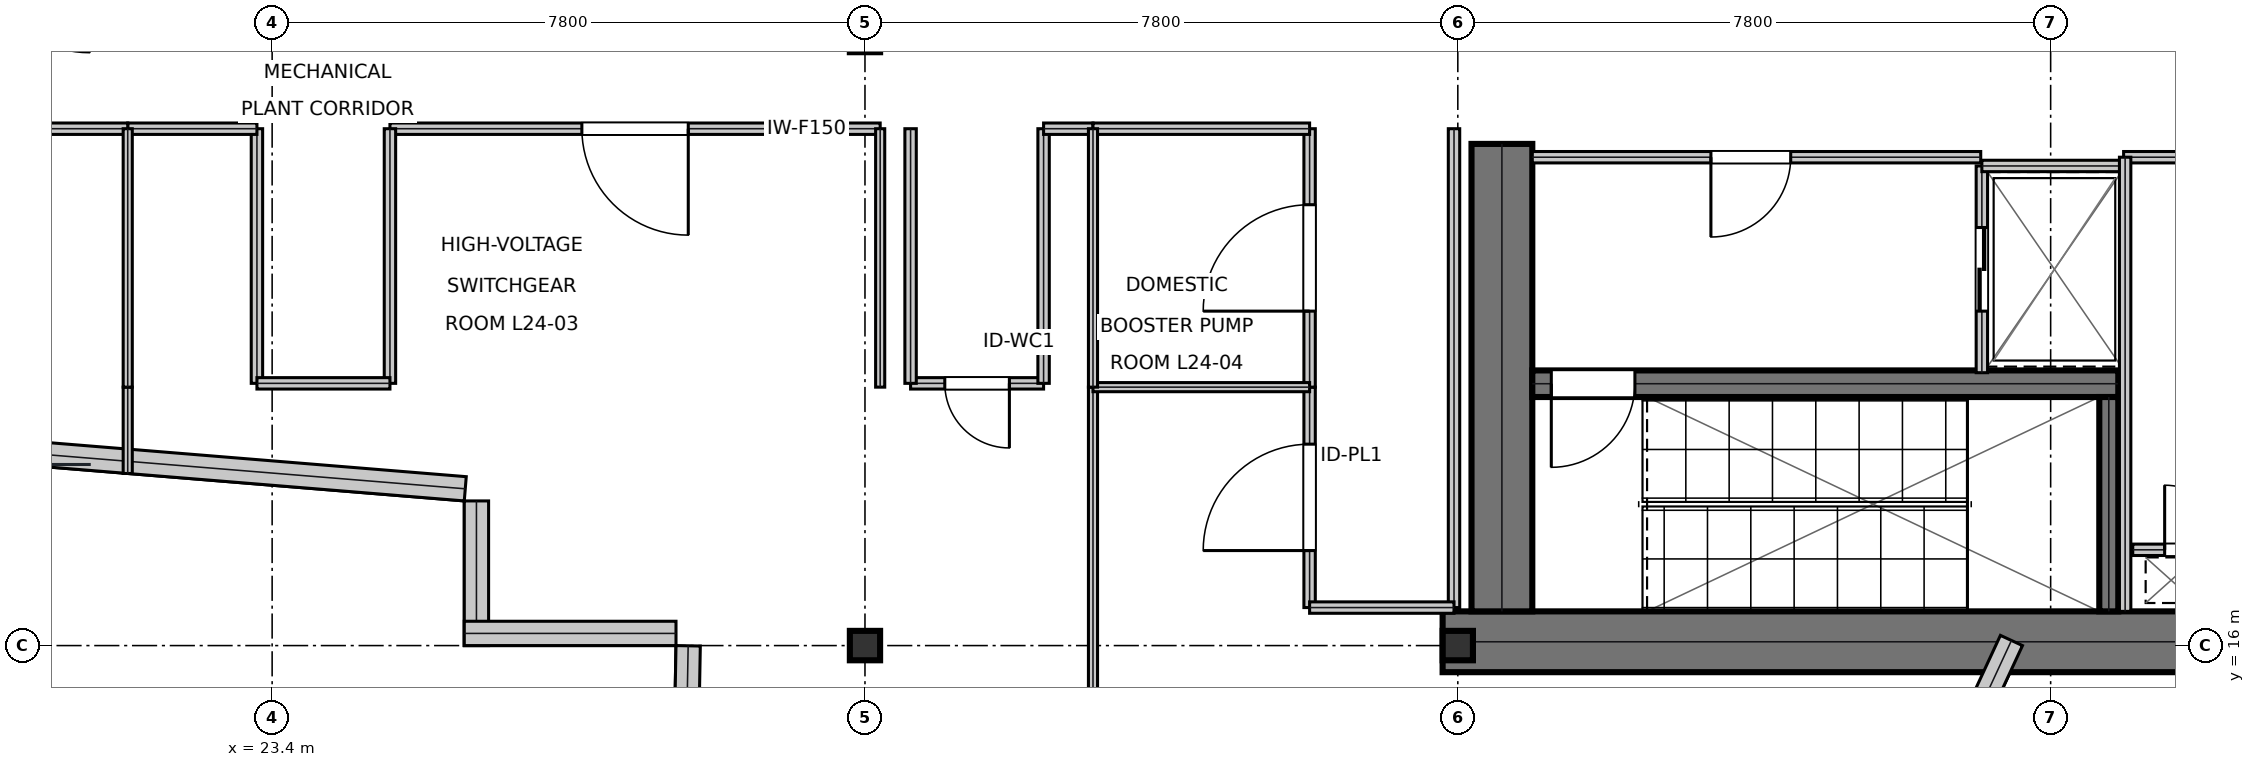
"""IFC4 building model, lengths in metres.
Left out: names, types, materials, properties, quantities, classifications, styles, units other than length and angle.
Written with IfcOpenShell. Run it as: python <this file> out.ifc"""

import sys

from ifc_helpers import new_model, si_unit, direction, frame, frame_2d, origin, origin_2d, place, context, subcontext, project, spatial, rectangle, i_section, extrude, element, fill, save


model = new_model("IFC4")
c1 = context("Model", 3, precision=1e-05, world=origin(), true_north=direction((0.0, 1.0)))
c2 = subcontext(c1, "Body", "Model", "MODEL_VIEW")
j1 = project(units=[si_unit("LENGTHUNIT", "METRE"), si_unit("PLANEANGLEUNIT", "RADIAN")], contexts=[c1])
p1 = place(None, origin())
s1 = spatial("IfcSite", under=j1, at=p1, CompositionType="ELEMENT")
p2 = place(p1, origin())
s2 = spatial("IfcBuilding", under=s1, at=p2, CompositionType="ELEMENT")
p3 = place(p2, frame((0.0, 0.0, 106.65)))
s3 = spatial("IfcBuildingStorey", under=s2, at=p3, CompositionType="ELEMENT", Elevation=106.65)
p4 = place(p3, frame((38.8, 16.05, 0.0), z_axis=(0.0, 0.0, 1.0), x_axis=(1.0, 0.0, 0.0)))
e1 = element("IfcWall", 1, at=p4, inside=s3, PredefinedType="SHEAR", context=c2, shape_type="SweptSolid", body=[
    extrude(rectangle(XDim=16.0, YDim=0.8, at=frame_2d((8.0, 0.0))), origin(), (0.0, 0.0, 1.0), 5.12),
])
p5 = place(p3, frame((39.58, 16.45, 0.0), z_axis=(0.0, 0.0, 1.0), x_axis=(0.0, 1.0, 0.0)))
e2 = element("IfcWall", 2, at=p5, inside=s3, PredefinedType="SHEAR", context=c2, shape_type="SweptSolid", body=[
    extrude(rectangle(XDim=6.15, YDim=0.8, at=frame_2d((3.075, 0.0))), origin(), (0.0, 0.0, 1.0), 5.12),
])
p6 = place(p3, frame((39.98, 19.445, 0.0), z_axis=(0.0, 0.0, 1.0), x_axis=(1.0, 0.0, 0.0)))
e3 = element("IfcWall", 3, at=p6, inside=s3, PredefinedType="SHEAR", context=c2, shape_type="SweptSolid", body=[
    extrude(rectangle(XDim=7.71, YDim=0.35, at=frame_2d((3.855, 0.0))), origin(), (0.0, 0.0, 1.0), 5.12),
])
p7 = place(p6, frame((0.25, 0.0, 0.0)))
e4 = element("IfcOpeningElement", 4, at=p7, cuts=e3, PredefinedType="OPENING", context=c2, shape_type="SweptSolid", body=[
    extrude(rectangle(XDim=1.1, YDim=2.15, at=frame_2d((0.55, 1.075))), frame((0.0, 0.185, 0.0), z_axis=(0.0, -1.0, 0.0), x_axis=(1.0, 0.0, 0.0)), (0.0, 0.0, 1.0), 0.37),
])
p8 = place(p3, frame((47.565, 16.45, 0.0), z_axis=(0.0, 0.0, 1.0), x_axis=(0.0, 1.0, 0.0)))
e5 = element("IfcWall", 5, at=p8, inside=s3, PredefinedType="SHEAR", context=c2, shape_type="SweptSolid", body=[
    extrude(rectangle(XDim=2.82, YDim=0.25, at=frame_2d((1.41, 0.0))), origin(), (0.0, 0.0, 1.0), 5.12),
])
for number, where, z_axis, x_axis in (
    (6, (31.2, 16.0, 0.0), (0.0, 0.0, 1.0), (1.0, 0.0, 0.0)),
    (7, (39.0, 16.0, 0.0), (0.0, 0.0, 1.0), (1.0, 0.0, 0.0)),
):
    element("IfcColumn", number, at=place(p3, frame(where, z_axis=z_axis, x_axis=x_axis)), inside=s3, PredefinedType="COLUMN", context=c2, shape_type="SweptSolid", body=[
        extrude(i_section(OverallWidth=0.398, OverallDepth=0.387, WebThickness=0.021, FlangeThickness=0.033, at=origin_2d()), origin(), (0.0, 0.0, 1.0), 5.394),
    ])
p9 = place(p3, frame((9.513, 19.402, 0.0), z_axis=(0.0, 0.0, 1.0), x_axis=(0.996692994059, -0.081259310815, 0.0)))
e8 = element("IfcWall", 8, at=p9, inside=s3, PredefinedType="STANDARD", context=c2, shape_type="SweptSolid", body=[
    extrude(rectangle(XDim=16.482, YDim=0.32, at=frame_2d((8.241, 0.0))), origin(), (0.0, 0.0, 1.0), 4.648),
])
p10 = place(p3, frame((26.088, 17.903, 0.0), z_axis=(0.0, 0.0, 1.0), x_axis=(0.0, -1.0, 0.0)))
e9 = element("IfcWall", 9, at=p10, inside=s3, PredefinedType="STANDARD", context=c2, shape_type="SweptSolid", body=[
    extrude(rectangle(XDim=1.903, YDim=0.32, at=frame_2d((0.952, 0.0))), origin(), (0.0, 0.0, 1.0), 4.648),
])
p11 = place(p3, frame((25.928, 16.16, 0.0), z_axis=(0.0, 0.0, 1.0), x_axis=(1.0, 0.0, 0.0)))
e10 = element("IfcWall", 10, at=p11, inside=s3, PredefinedType="STANDARD", context=c2, shape_type="SweptSolid", body=[
    extrude(rectangle(XDim=2.786, YDim=0.32, at=frame_2d((1.393, 0.0))), origin(), (0.0, 0.0, 1.0), 5.12),
])
p12 = place(p3, frame((28.874, 15.997, 0.0), z_axis=(0.0, 0.0, 1.0), x_axis=(-0.017987206329, -0.999838217117, 0.0)))
e11 = element("IfcWall", 11, at=p12, inside=s3, PredefinedType="STANDARD", context=c2, shape_type="SweptSolid", body=[
    extrude(rectangle(XDim=10.723, YDim=0.32, at=frame_2d((5.361, 0.0))), origin(), (0.0, 0.0, 1.0), 5.12),
])
p13 = place(p3, frame((41.396, 5.513, 0.0), z_axis=(0.0, 0.0, 1.0), x_axis=(0.420271770487, 0.907398280212, 0.0)))
e12 = element("IfcWall", 12, at=p13, inside=s3, PredefinedType="STANDARD", context=c2, shape_type="SweptSolid", body=[
    extrude(rectangle(XDim=11.631, YDim=0.32, at=frame_2d((5.815, 0.0))), origin(), (0.0, 0.0, 1.0), 4.648),
])
p14 = place(p3, frame((39.98, 22.425, 0.0), z_axis=(0.0, 0.0, 1.0), x_axis=(1.0, 0.0, 0.0)))
e13 = element("IfcWall", 13, at=p14, inside=s3, PredefinedType="PARTITIONING", context=c2, shape_type="SweptSolid", body=[
    extrude(rectangle(XDim=5.9, YDim=0.15, at=frame_2d((2.95, 0.0))), origin(), (0.0, 0.0, 1.0), 5.12),
])
p15 = place(p14, frame((2.35, 0.0, 0.0)))
e14 = element("IfcOpeningElement", 14, at=p15, cuts=e13, PredefinedType="OPENING", context=c2, shape_type="SweptSolid", body=[
    extrude(rectangle(XDim=1.05, YDim=2.15, at=frame_2d((0.525, 1.075))), frame((0.0, 0.085, 0.0), z_axis=(0.0, -1.0, 0.0), x_axis=(1.0, 0.0, 0.0)), (0.0, 0.0, 1.0), 0.17),
])
p16 = place(p3, frame((45.895, 19.59, 0.0), z_axis=(0.0, 0.0, 1.0), x_axis=(0.0, 1.0, 0.0)))
e15 = element("IfcWall", 15, at=p16, inside=s3, PredefinedType="PARTITIONING", context=c2, shape_type="SweptSolid", body=[
    extrude(rectangle(XDim=2.72, YDim=0.15, at=frame_2d((1.36, 0.0))), origin(), (0.0, 0.0, 1.0), 5.12),
])
p17 = place(p16, frame((0.81, 0.0, 0.0)))
e16 = element("IfcOpeningElement", 16, at=p17, cuts=e15, PredefinedType="OPENING", context=c2, shape_type="SweptSolid", body=[
    extrude(rectangle(XDim=1.1, YDim=2.15, at=frame_2d((0.55, 1.075))), frame((0.0, 0.085, 0.0), z_axis=(0.0, -1.0, 0.0), x_axis=(1.0, 0.0, 0.0)), (0.0, 0.0, 1.0), 0.17),
])
p18 = place(p3, frame((45.895, 22.31, 0.0), z_axis=(0.0, 0.0, 1.0), x_axis=(1.0, 0.0, 0.0)))
e17 = element("IfcWall", 17, at=p18, inside=s3, PredefinedType="PARTITIONING", context=c2, shape_type="SweptSolid", body=[
    extrude(rectangle(XDim=1.915, YDim=0.15, at=frame_2d((0.958, 0.0))), origin(), (0.0, 0.0, 1.0), 5.12),
])
p19 = place(p3, frame((47.88, 17.26, 0.0), z_axis=(0.0, 0.0, 1.0), x_axis=(1.0, 0.0, 0.0)))
e18 = element("IfcWall", 18, at=p19, inside=s3, PredefinedType="PARTITIONING", context=c2, shape_type="SweptSolid", body=[
    extrude(rectangle(XDim=1.72, YDim=0.15, at=frame_2d((0.86, 0.0))), origin(), (0.0, 0.0, 1.0), 5.12),
])
p20 = place(p19, frame((0.42, 0.0, 0.0)))
e19 = element("IfcOpeningElement", 19, at=p20, cuts=e18, PredefinedType="OPENING", context=c2, shape_type="SweptSolid", body=[
    extrude(rectangle(XDim=0.85, YDim=2.15, at=frame_2d((0.425, 1.075))), frame((0.0, 0.085, 0.0), z_axis=(0.0, -1.0, 0.0), x_axis=(1.0, 0.0, 0.0)), (0.0, 0.0, 1.0), 0.17),
])
p21 = place(p3, frame((47.76, 22.425, 0.0), z_axis=(0.0, 0.0, 1.0), x_axis=(1.0, 0.0, 0.0)))
e20 = element("IfcWall", 20, at=p21, inside=s3, PredefinedType="PARTITIONING", context=c2, shape_type="SweptSolid", body=[
    extrude(rectangle(XDim=1.96, YDim=0.15, at=frame_2d((0.98, 0.0))), origin(), (0.0, 0.0, 1.0), 5.12),
])
p22 = place(p3, frame((47.78, 16.45, 0.0), z_axis=(0.0, 0.0, 1.0), x_axis=(0.0, 1.0, 0.0)))
e21 = element("IfcWall", 21, at=p22, inside=s3, PredefinedType="PARTITIONING", context=c2, shape_type="SweptSolid", body=[
    extrude(rectangle(XDim=5.975, YDim=0.15, at=frame_2d((2.988, 0.0))), origin(), (0.0, 0.0, 1.0), 5.12),
])
p23 = place(p3, frame((37.05, 16.5, 0.0), z_axis=(0.0, 0.0, 1.0), x_axis=(0.0, 1.0, 0.0)))
e22 = element("IfcWall", 22, at=p23, inside=s3, PredefinedType="PARTITIONING", context=c2, shape_type="SweptSolid", body=[
    extrude(rectangle(XDim=2.9, YDim=0.15, at=frame_2d((1.45, 0.0))), origin(), (0.0, 0.0, 1.0), 4.753),
])
p24 = place(p23, frame((0.75, 0.0, 0.0)))
e23 = element("IfcOpeningElement", 23, at=p24, cuts=e22, PredefinedType="OPENING", context=c2, shape_type="SweptSolid", body=[
    extrude(rectangle(XDim=1.4, YDim=2.2, at=frame_2d((0.7, 1.1))), frame((0.0, 0.085, 0.0), z_axis=(0.0, -1.0, 0.0), x_axis=(1.0, 0.0, 0.0)), (0.0, 0.0, 1.0), 0.17),
])
p25 = place(p3, frame((31.8, 19.45, 0.0), z_axis=(0.0, 0.0, 1.0), x_axis=(1.0, 0.0, 0.0)))
e24 = element("IfcWall", 24, at=p25, inside=s3, PredefinedType="PARTITIONING", context=c2, shape_type="SweptSolid", body=[
    extrude(rectangle(XDim=1.75, YDim=0.15, at=frame_2d((0.875, 0.0))), origin(), (0.0, 0.0, 1.0), 5.12),
])
p26 = place(p25, frame((0.45, 0.0, 0.0)))
e25 = element("IfcOpeningElement", 25, at=p26, cuts=e24, PredefinedType="OPENING", context=c2, shape_type="SweptSolid", body=[
    extrude(rectangle(XDim=0.85, YDim=2.15, at=frame_2d((0.425, 1.075))), frame((0.0, 0.085, 0.0), z_axis=(0.0, -1.0, 0.0), x_axis=(1.0, 0.0, 0.0)), (0.0, 0.0, 1.0), 0.17),
])
p27 = place(p3, frame((24.95, 22.8, 0.0), z_axis=(0.0, 0.0, 1.0), x_axis=(1.0, 0.0, 0.0)))
e26 = element("IfcWall", 26, at=p27, inside=s3, PredefinedType="PARTITIONING", context=c2, shape_type="SweptSolid", body=[
    extrude(rectangle(XDim=6.45, YDim=0.15, at=frame_2d((3.225, 0.0))), origin(), (0.0, 0.0, 1.0), 4.5),
])
p28 = place(p27, frame((2.525, 0.0, 0.0)))
e27 = element("IfcOpeningElement", 27, at=p28, cuts=e26, PredefinedType="OPENING", context=c2, shape_type="SweptSolid", body=[
    extrude(rectangle(XDim=1.4, YDim=2.2, at=frame_2d((0.7, 1.1))), frame((0.0, 0.085, 0.0), z_axis=(0.0, -1.0, 0.0), x_axis=(1.0, 0.0, 0.0)), (0.0, 0.0, 1.0), 0.17),
])
p29 = place(p3, frame((37.05, 19.4, 0.0), z_axis=(0.0, 0.0, 1.0), x_axis=(0.0, 1.0, 0.0)))
e28 = element("IfcWall", 28, at=p29, inside=s3, PredefinedType="PARTITIONING", context=c2, shape_type="SweptSolid", body=[
    extrude(rectangle(XDim=3.4, YDim=0.15, at=frame_2d((1.7, 0.0))), origin(), (0.0, 0.0, 1.0), 4.753),
])
p30 = place(p29, frame((1.0, 0.0, 0.0)))
e29 = element("IfcOpeningElement", 29, at=p30, cuts=e28, PredefinedType="OPENING", context=c2, shape_type="SweptSolid", body=[
    extrude(rectangle(XDim=1.4, YDim=2.2, at=frame_2d((0.7, 1.1))), frame((0.0, 0.085, 0.0), z_axis=(0.0, -1.0, 0.0), x_axis=(1.0, 0.0, 0.0)), (0.0, 0.0, 1.0), 0.17),
])
p31 = place(p3, frame((38.95, 16.5, 0.0), z_axis=(0.0, 0.0, 1.0), x_axis=(0.0, 1.0, 0.0)))
e30 = element("IfcWall", 30, at=p31, inside=s3, PredefinedType="PARTITIONING", context=c2, shape_type="SweptSolid", body=[
    extrude(rectangle(XDim=6.3, YDim=0.15, at=frame_2d((3.15, 0.0))), origin(), (0.0, 0.0, 1.0), 4.753),
])
p32 = place(p3, frame((37.05, 16.5, 0.0), z_axis=(0.0, 0.0, 1.0), x_axis=(1.0, 0.0, 0.0)))
e31 = element("IfcWall", 31, at=p32, inside=s3, PredefinedType="PARTITIONING", context=c2, shape_type="SweptSolid", body=[
    extrude(rectangle(XDim=1.9, YDim=0.15, at=frame_2d((0.95, 0.0))), origin(), (0.0, 0.0, 1.0), 5.12),
])
for number, where, z_axis, x_axis in (
    (32, (33.55, 19.45, 0.0), (0.0, 0.0, 1.0), (0.0, 1.0, 0.0)),
    (33, (31.8, 19.45, 0.0), (0.0, 0.0, 1.0), (0.0, 1.0, 0.0)),
):
    element("IfcWall", number, at=place(p3, frame(where, z_axis=z_axis, x_axis=x_axis)), inside=s3, PredefinedType="PARTITIONING", context=c2, shape_type="SweptSolid", body=[
        extrude(rectangle(XDim=3.35, YDim=0.15, at=frame_2d((1.675, 0.0))), origin(), (0.0, 0.0, 1.0), 4.753),
    ])
p33 = place(p3, frame((33.55, 22.8, 0.0), z_axis=(0.0, 0.0, 1.0), x_axis=(1.0, 0.0, 0.0)))
e34 = element("IfcWall", 34, at=p33, inside=s3, PredefinedType="PARTITIONING", context=c2, shape_type="SweptSolid", body=[
    extrude(rectangle(XDim=0.65, YDim=0.15, at=frame_2d((0.325, 0.0))), origin(), (0.0, 0.0, 1.0), 5.12),
])
p34 = place(p3, frame((24.95, 19.45, 0.0), z_axis=(0.0, 0.0, 1.0), x_axis=(0.0, 1.0, 0.0)))
e35 = element("IfcWall", 35, at=p34, inside=s3, PredefinedType="PARTITIONING", context=c2, shape_type="SweptSolid", body=[
    extrude(rectangle(XDim=3.35, YDim=0.15, at=frame_2d((1.675, 0.0))), origin(), (0.0, 0.0, 1.0), 5.12),
])
p35 = place(p3, frame((23.2, 19.45, 0.0), z_axis=(0.0, 0.0, 1.0), x_axis=(0.0, 1.0, 0.0)))
e36 = element("IfcWall", 36, at=p35, inside=s3, PredefinedType="PARTITIONING", context=c2, shape_type="SweptSolid", body=[
    extrude(rectangle(XDim=3.35, YDim=0.15, at=frame_2d((1.675, 0.0))), origin(), (0.0, 0.0, 1.0), 4.5),
])
p36 = place(p3, frame((23.2, 19.45, 0.0), z_axis=(0.0, 0.0, 1.0), x_axis=(1.0, 0.0, 0.0)))
e37 = element("IfcWall", 37, at=p36, inside=s3, PredefinedType="PARTITIONING", context=c2, shape_type="SweptSolid", body=[
    extrude(rectangle(XDim=1.75, YDim=0.15, at=frame_2d((0.875, 0.0))), origin(), (0.0, 0.0, 1.0), 5.12),
])
p37 = place(p3, frame((21.5, 22.8, 0.0), z_axis=(0.0, 0.0, 1.0), x_axis=(1.0, 0.0, 0.0)))
e38 = element("IfcWall", 38, at=p37, inside=s3, PredefinedType="PARTITIONING", context=c2, shape_type="SweptSolid", body=[
    extrude(rectangle(XDim=1.7, YDim=0.15, at=frame_2d((0.85, 0.0))), origin(), (0.0, 0.0, 1.0), 4.5),
])
p38 = place(p3, frame((34.2, 22.8, 0.0), z_axis=(0.0, 0.0, 1.0), x_axis=(1.0, 0.0, 0.0)))
e39 = element("IfcWall", 39, at=p38, inside=s3, PredefinedType="PARTITIONING", context=c2, shape_type="SweptSolid", body=[
    extrude(rectangle(XDim=2.85, YDim=0.15, at=frame_2d((1.425, 0.0))), origin(), (0.0, 0.0, 1.0), 5.12),
])
p39 = place(p3, frame((16.5, 22.8, 0.0), z_axis=(0.0, 0.0, 1.0), x_axis=(1.0, 0.0, 0.0)))
e40 = element("IfcWall", 40, at=p39, inside=s3, PredefinedType="PARTITIONING", context=c2, shape_type="SweptSolid", body=[
    extrude(rectangle(XDim=5.0, YDim=0.15, at=frame_2d((2.5, 0.0))), origin(), (0.0, 0.0, 1.0), 4.753),
])
p40 = place(p3, frame((34.2, 3.822, 0.0), z_axis=(0.0, 0.0, 1.0), x_axis=(0.0, 1.0, 0.0)))
e41 = element("IfcWall", 41, at=p40, inside=s3, PredefinedType="PARTITIONING", context=c2, shape_type="SweptSolid", body=[
    extrude(rectangle(XDim=15.578, YDim=0.12, at=frame_2d((7.789, 0.0))), origin(), (0.0, 0.0, 1.0), 4.5),
])
p41 = place(p3, frame((34.2, 19.4, 0.0), z_axis=(0.0, 0.0, 1.0), x_axis=(1.0, 0.0, 0.0)))
e42 = element("IfcWall", 42, at=p41, inside=s3, PredefinedType="PARTITIONING", context=c2, shape_type="SweptSolid", body=[
    extrude(rectangle(XDim=2.85, YDim=0.12, at=frame_2d((1.425, 0.0))), origin(), (0.0, 0.0, 1.0), 5.12),
])
p42 = place(p3, frame((31.4, 19.4, 0.0), z_axis=(0.0, 0.0, 1.0), x_axis=(0.0, 1.0, 0.0)))
e43 = element("IfcWall", 43, at=p42, inside=s3, PredefinedType="PARTITIONING", context=c2, shape_type="SweptSolid", body=[
    extrude(rectangle(XDim=3.4, YDim=0.12, at=frame_2d((1.7, 0.0))), origin(), (0.0, 0.0, 1.0), 4.5),
])
p43 = place(p3, frame((34.2, 19.4, 0.0), z_axis=(0.0, 0.0, 1.0), x_axis=(0.0, 1.0, 0.0)))
e44 = element("IfcWall", 44, at=p43, inside=s3, PredefinedType="PARTITIONING", context=c2, shape_type="SweptSolid", body=[
    extrude(rectangle(XDim=3.4, YDim=0.12, at=frame_2d((1.7, 0.0))), origin(), (0.0, 0.0, 1.0), 4.753),
])
p44 = place(p3, frame((21.5, 18.264, 0.0), z_axis=(0.0, 0.0, 1.0), x_axis=(0.0, 1.0, 0.0)))
e45 = element("IfcWall", 45, at=p44, inside=s3, PredefinedType="PARTITIONING", context=c2, shape_type="SweptSolid", body=[
    extrude(rectangle(XDim=1.136, YDim=0.12, at=frame_2d((0.568, 0.0))), origin(), (0.0, 0.0, 1.0), 5.12),
])
p45 = place(p3, frame((21.5, 19.4, 0.0), z_axis=(0.0, 0.0, 1.0), x_axis=(0.0, 1.0, 0.0)))
e46 = element("IfcWall", 46, at=p45, inside=s3, PredefinedType="PARTITIONING", context=c2, shape_type="SweptSolid", body=[
    extrude(rectangle(XDim=3.4, YDim=0.12, at=frame_2d((1.7, 0.0))), origin(), (0.0, 0.0, 1.0), 4.5),
])
p46 = place(p15, frame((1.05, 0.0, 0.0), z_axis=(0.0, 0.0, 1.0), x_axis=(-1.0, 0.0, 0.0)))
e47 = element("IfcDoor", 47, at=p46, inside=s3, OperationType="SINGLE_SWING_RIGHT", PredefinedType="DOOR", context=c2, shape_type="SweptSolid", body=[
    extrude(rectangle(XDim=1.05, YDim=2.15, at=frame_2d((0.525, 1.075))), frame((0.0, 0.025, 0.0), z_axis=(0.0, -1.0, 0.0), x_axis=(1.0, 0.0, 0.0)), (0.0, 0.0, 1.0), 0.05),
])
fill(e14, e47)
p47 = place(p17, frame((1.1, 0.0, 0.0), z_axis=(0.0, 0.0, 1.0), x_axis=(-1.0, 0.0, 0.0)))
e48 = element("IfcDoor", 48, at=p47, inside=s3, OperationType="DOUBLE_DOOR_SLIDING", PredefinedType="DOOR", context=c2, shape_type="SweptSolid", body=[
    extrude(rectangle(XDim=1.1, YDim=2.15, at=frame_2d((0.55, 1.075))), frame((0.0, 0.025, 0.0), z_axis=(0.0, -1.0, 0.0), x_axis=(1.0, 0.0, 0.0)), (0.0, 0.0, 1.0), 0.05),
])
fill(e16, e48)
p48 = place(p20, origin())
e49 = element("IfcDoor", 49, at=p48, inside=s3, OperationType="SINGLE_SWING_LEFT", PredefinedType="TRAPDOOR", context=c2, shape_type="SweptSolid", body=[
    extrude(rectangle(XDim=0.85, YDim=2.15, at=frame_2d((0.425, 1.075))), frame((0.0, 0.025, 0.0), z_axis=(0.0, -1.0, 0.0), x_axis=(1.0, 0.0, 0.0)), (0.0, 0.0, 1.0), 0.05),
])
fill(e19, e49)
p49 = place(p24, origin())
e50 = element("IfcDoor", 50, at=p49, inside=s3, OperationType="SINGLE_SWING_LEFT", PredefinedType="DOOR", context=c2, shape_type="SweptSolid", body=[
    extrude(rectangle(XDim=1.4, YDim=2.2, at=frame_2d((0.7, 1.1))), frame((0.0, 0.025, 0.0), z_axis=(0.0, -1.0, 0.0), x_axis=(1.0, 0.0, 0.0)), (0.0, 0.0, 1.0), 0.05),
])
fill(e23, e50)
p50 = place(p26, frame((0.85, 0.0, 0.0), z_axis=(0.0, 0.0, 1.0), x_axis=(-1.0, 0.0, 0.0)))
e51 = element("IfcDoor", 51, at=p50, inside=s3, OperationType="SINGLE_SWING_LEFT", PredefinedType="DOOR", context=c2, shape_type="SweptSolid", body=[
    extrude(rectangle(XDim=0.85, YDim=2.15, at=frame_2d((0.425, 1.075))), frame((0.0, 0.025, 0.0), z_axis=(0.0, -1.0, 0.0), x_axis=(1.0, 0.0, 0.0)), (0.0, 0.0, 1.0), 0.05),
])
fill(e25, e51)
p51 = place(p28, frame((1.4, 0.0, 0.0), z_axis=(0.0, 0.0, 1.0), x_axis=(-1.0, 0.0, 0.0)))
e52 = element("IfcDoor", 52, at=p51, inside=s3, OperationType="SINGLE_SWING_LEFT", PredefinedType="DOOR", context=c2, shape_type="SweptSolid", body=[
    extrude(rectangle(XDim=1.4, YDim=2.2, at=frame_2d((0.7, 1.1))), frame((0.0, 0.025, 0.0), z_axis=(0.0, -1.0, 0.0), x_axis=(1.0, 0.0, 0.0)), (0.0, 0.0, 1.0), 0.05),
])
fill(e27, e52)
p52 = place(p30, origin())
e53 = element("IfcDoor", 53, at=p52, inside=s3, OperationType="SINGLE_SWING_LEFT", PredefinedType="DOOR", context=c2, shape_type="SweptSolid", body=[
    extrude(rectangle(XDim=1.4, YDim=2.2, at=frame_2d((0.7, 1.1))), frame((0.0, 0.025, 0.0), z_axis=(0.0, -1.0, 0.0), x_axis=(1.0, 0.0, 0.0)), (0.0, 0.0, 1.0), 0.05),
])
fill(e29, e53)
p53 = place(p7, frame((1.1, 0.0, 0.0), z_axis=(0.0, 0.0, 1.0), x_axis=(-1.0, 0.0, 0.0)))
e54 = element("IfcDoor", 54, at=p53, inside=s3, OperationType="SINGLE_SWING_RIGHT", PredefinedType="DOOR", context=c2, shape_type="SweptSolid", body=[
    extrude(rectangle(XDim=1.1, YDim=2.15, at=frame_2d((0.55, 1.075))), frame((0.0, 0.025, 0.0), z_axis=(0.0, -1.0, 0.0), x_axis=(1.0, 0.0, 0.0)), (0.0, 0.0, 1.0), 0.05),
])
fill(e4, e54)
save(model, sys.argv[1])
